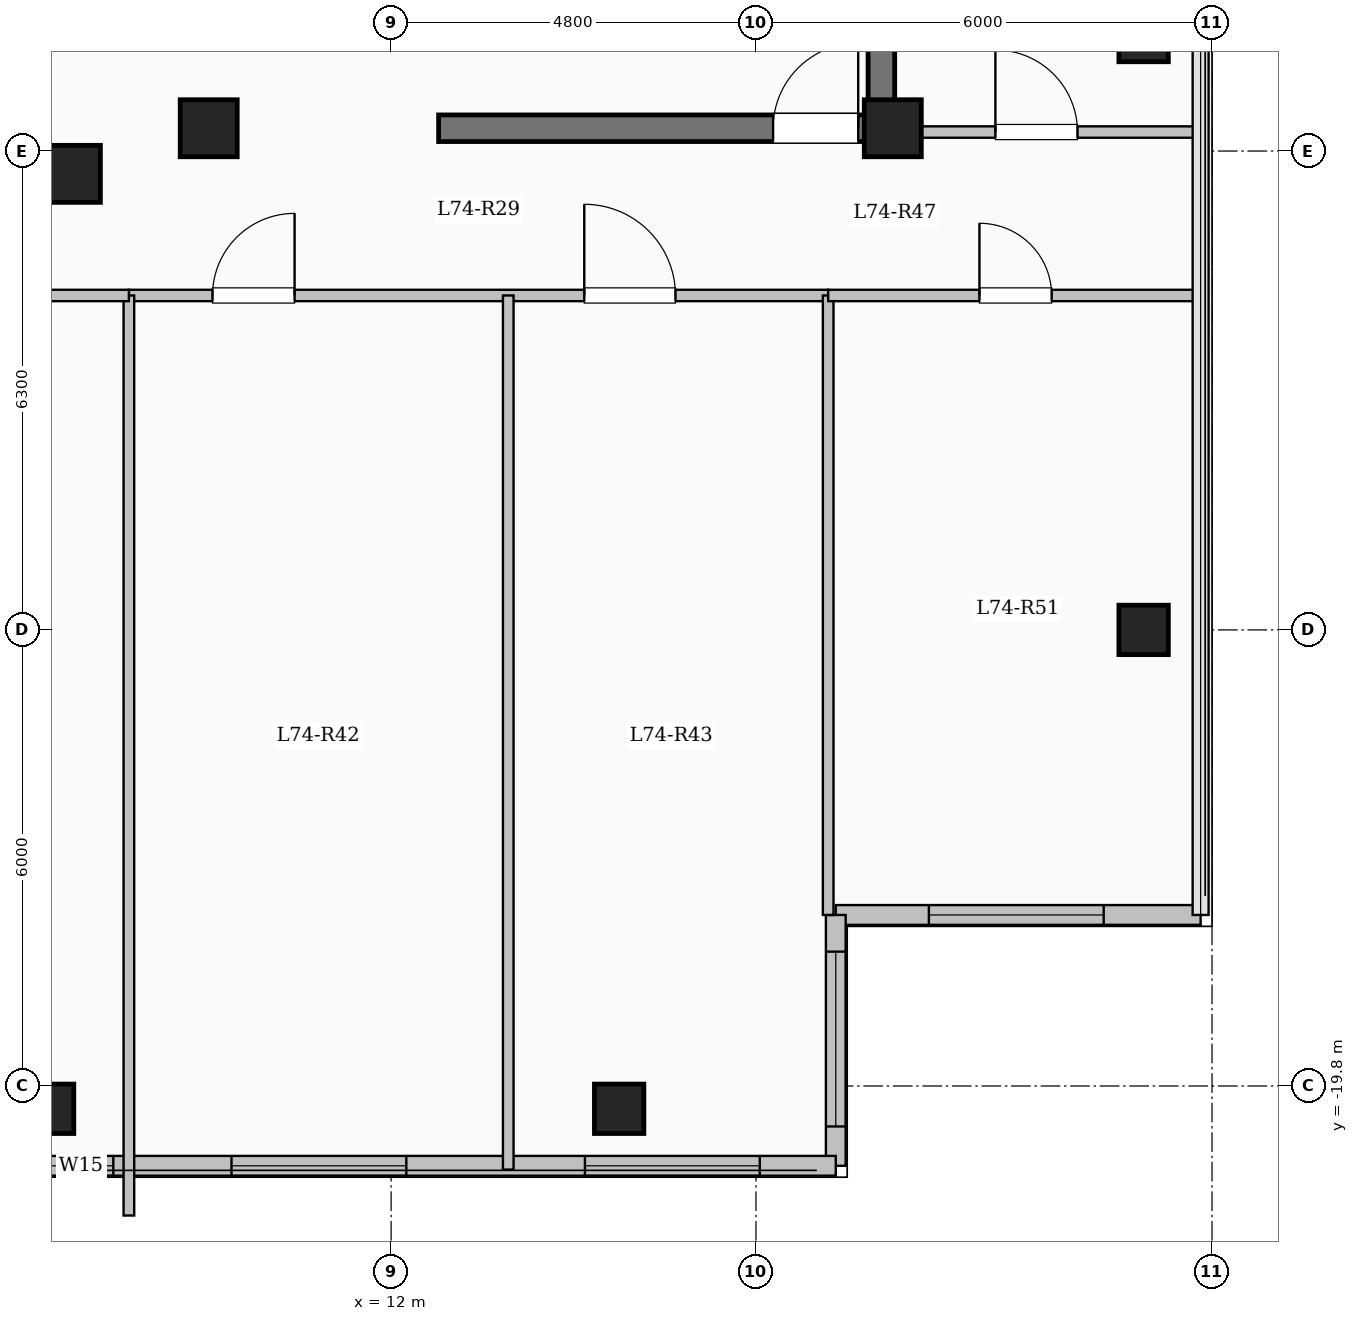
"""IFC4 building model, lengths in metres.
Left out: names, types, materials, properties, quantities, classifications, styles, units other than length and angle.
Written with IfcOpenShell. Run it as: python <this file> out.ifc"""

import sys

from ifc_helpers import new_model, si_unit, direction, frame, frame_2d, origin, origin_2d, place, context, subcontext, project, spatial, rectangle, extrude, element, fill, save


model = new_model("IFC4")
c1 = context("Model", 3, precision=1e-05, world=origin(), true_north=direction((0.0, 1.0)))
c2 = subcontext(c1, "Body", "Model", "MODEL_VIEW")
j1 = project(units=[si_unit("LENGTHUNIT", "METRE"), si_unit("PLANEANGLEUNIT", "RADIAN")], contexts=[c1])
p1 = place(None, origin())
s1 = spatial("IfcSite", under=j1, at=p1, CompositionType="ELEMENT")
p2 = place(p1, origin())
s2 = spatial("IfcBuilding", under=s1, at=p2, CompositionType="ELEMENT")
p3 = place(p2, frame((0.0, 0.0, 271.65)))
s3 = spatial("IfcBuildingStorey", under=s2, at=p3, CompositionType="ELEMENT", Elevation=271.65)
for number, where, z_axis, x_axis in (
    (1, (7.8, -7.8, 0.0), (0.0, 0.0, 1.0), (1.0, 0.0, 0.0)),
    (2, (9.6, -7.2, 0.0), (0.0, 0.0, 1.0), (1.0, 0.0, 0.0)),
    (3, (18.6, -7.2, 0.0), (0.0, 0.0, 1.0), (1.0, 0.0, 0.0)),
):
    element("IfcColumn", number, at=place(p3, frame(where, z_axis=z_axis, x_axis=x_axis)), inside=s3, PredefinedType="COLUMN", context=c2, shape_type="SweptSolid", body=[
        extrude(rectangle(XDim=0.75, YDim=0.75, at=origin_2d()), origin(), (0.0, 0.0, 1.0), 4.65),
    ])
for number, where, z_axis, x_axis in (
    (4, (7.5, -20.1, 0.0), (0.0, 0.0, 1.0), (1.0, 0.0, 0.0)),
    (5, (15.0, -20.1, 0.0), (0.0, 0.0, 1.0), (1.0, 0.0, 0.0)),
    (6, (21.9, -13.8, 0.0), (0.0, 0.0, 1.0), (1.0, 0.0, 0.0)),
    (7, (21.9, -6.0, 0.0), (0.0, 0.0, 1.0), (1.0, 0.0, 0.0)),
):
    element("IfcColumn", number, at=place(p3, frame(where, z_axis=z_axis, x_axis=x_axis)), inside=s3, PredefinedType="COLUMN", context=c2, shape_type="SweptSolid", body=[
        extrude(rectangle(XDim=0.65, YDim=0.65, at=origin_2d()), origin(), (0.0, 0.0, 1.0), 4.65),
    ])
p4 = place(p3, frame((22.65, -17.55, 0.0), z_axis=(0.0, 0.0, 1.0), x_axis=(-1.0, 0.0, 0.0)))
e8 = element("IfcWall", 8, at=p4, inside=s3, PredefinedType="SOLIDWALL", context=c2, shape_type="SweptSolid", body=[
    extrude(rectangle(XDim=4.8, YDim=0.26, at=frame_2d((2.4, 0.0))), origin(), (0.0, 0.0, 1.0), 4.35),
])
p5 = place(p4, frame((1.275, 0.0, 0.85)))
e9 = element("IfcOpeningElement", 9, at=p5, cuts=e8, PredefinedType="OPENING", context=c2, shape_type="SweptSolid", body=[
    extrude(rectangle(XDim=2.3, YDim=2.2, at=frame_2d((1.15, 1.1))), frame((0.0, 0.14, 0.0), z_axis=(0.0, -1.0, 0.0), x_axis=(1.0, 0.0, 0.0)), (0.0, 0.0, 1.0), 0.28),
])
p6 = place(p3, frame((17.85, -17.55, 0.0), z_axis=(0.0, 0.0, 1.0), x_axis=(0.0, -1.0, 0.0)))
e10 = element("IfcWall", 10, at=p6, inside=s3, PredefinedType="SOLIDWALL", context=c2, shape_type="SweptSolid", body=[
    extrude(rectangle(XDim=3.3, YDim=0.26, at=frame_2d((1.65, 0.0))), origin(), (0.0, 0.0, 1.0), 4.35),
])
p7 = place(p6, frame((0.482, 0.0, 0.85)))
e11 = element("IfcOpeningElement", 11, at=p7, cuts=e10, PredefinedType="OPENING", context=c2, shape_type="SweptSolid", body=[
    extrude(rectangle(XDim=2.3, YDim=2.2, at=frame_2d((1.15, 1.1))), frame((0.0, 0.14, 0.0), z_axis=(0.0, -1.0, 0.0), x_axis=(1.0, 0.0, 0.0)), (0.0, 0.0, 1.0), 0.28),
])
p8 = place(p3, frame((17.85, -20.85, 0.0), z_axis=(0.0, 0.0, 1.0), x_axis=(-1.0, 0.0, 0.0)))
e12 = element("IfcWall", 12, at=p8, inside=s3, PredefinedType="SOLIDWALL", context=c2, shape_type="SweptSolid", body=[
    extrude(rectangle(XDim=10.5, YDim=0.26, at=frame_2d((5.25, 0.0))), origin(), (0.0, 0.0, 1.0), 4.35),
])
p9 = place(p8, frame((1.0, 0.0, 0.85)))
e13 = element("IfcOpeningElement", 13, at=p9, cuts=e12, PredefinedType="OPENING", context=c2, shape_type="SweptSolid", body=[
    extrude(rectangle(XDim=2.3, YDim=2.2, at=frame_2d((1.15, 1.1))), frame((0.0, 0.14, 0.0), z_axis=(0.0, -1.0, 0.0), x_axis=(1.0, 0.0, 0.0)), (0.0, 0.0, 1.0), 0.28),
])
p10 = place(p8, frame((5.65, 0.0, 0.85)))
e14 = element("IfcOpeningElement", 14, at=p10, cuts=e12, PredefinedType="OPENING", context=c2, shape_type="SweptSolid", body=[
    extrude(rectangle(XDim=2.3, YDim=2.2, at=frame_2d((1.15, 1.1))), frame((0.0, 0.14, 0.0), z_axis=(0.0, -1.0, 0.0), x_axis=(1.0, 0.0, 0.0)), (0.0, 0.0, 1.0), 0.28),
])
p11 = place(p8, frame((9.505, 0.0, 0.95)))
e15 = element("IfcOpeningElement", 15, at=p11, cuts=e12, PredefinedType="OPENING", context=c2, shape_type="SweptSolid", body=[
    extrude(rectangle(XDim=0.85, YDim=1.5, at=frame_2d((0.425, 0.75))), frame((0.0, 0.14, 0.0), z_axis=(0.0, -1.0, 0.0), x_axis=(1.0, 0.0, 0.0)), (0.0, 0.0, 1.0), 0.28),
])
p12 = place(p3, frame((18.45, -7.375, 0.0), z_axis=(0.0, 0.0, 1.0), x_axis=(0.0, 1.0, 0.0)))
e16 = element("IfcWall", 16, at=p12, inside=s3, PredefinedType="SHEAR", context=c2, shape_type="SweptSolid", body=[
    extrude(rectangle(XDim=14.05, YDim=0.35, at=frame_2d((7.025, 0.0))), origin(), (0.0, 0.0, 1.0), 4.65),
])
p13 = place(p3, frame((12.625, -7.2, 0.0), z_axis=(0.0, 0.0, 1.0), x_axis=(1.0, 0.0, 0.0)))
e17 = element("IfcWall", 17, at=p13, inside=s3, PredefinedType="SHEAR", context=c2, shape_type="SweptSolid", body=[
    extrude(rectangle(XDim=6.0, YDim=0.35, at=frame_2d((3.0, 0.0))), origin(), (0.0, 0.0, 1.0), 4.65),
])
p14 = place(p13, frame((4.4, 0.0, 0.0)))
e18 = element("IfcOpeningElement", 18, at=p14, cuts=e17, PredefinedType="OPENING", context=c2, shape_type="SweptSolid", body=[
    extrude(rectangle(XDim=1.12, YDim=2.15, at=frame_2d((0.56, 1.075))), frame((0.0, 0.185, 0.0), z_axis=(0.0, -1.0, 0.0), x_axis=(1.0, 0.0, 0.0)), (0.0, 0.0, 1.0), 0.37),
])
p15 = place(p3, frame((8.55, -9.4, 0.0), z_axis=(0.0, 0.0, 1.0), x_axis=(1.0, 0.0, 0.0)))
e19 = element("IfcWall", 19, at=p15, inside=s3, PredefinedType="PARTITIONING", context=c2, shape_type="SweptSolid", body=[
    extrude(rectangle(XDim=9.2, YDim=0.15, at=frame_2d((4.6, 0.0))), origin(), (0.0, 0.0, 1.0), 4.35),
])
p16 = place(p15, frame((1.1, 0.0, 0.0)))
e20 = element("IfcOpeningElement", 20, at=p16, cuts=e19, PredefinedType="OPENING", context=c2, shape_type="SweptSolid", body=[
    extrude(rectangle(XDim=1.08, YDim=2.15, at=frame_2d((0.54, 1.075))), frame((0.0, 0.085, 0.0), z_axis=(0.0, -1.0, 0.0), x_axis=(1.0, 0.0, 0.0)), (0.0, 0.0, 1.0), 0.17),
])
p17 = place(p15, frame((5.991, 0.0, 0.0)))
e21 = element("IfcOpeningElement", 21, at=p17, cuts=e19, PredefinedType="OPENING", context=c2, shape_type="SweptSolid", body=[
    extrude(rectangle(XDim=1.2, YDim=2.15, at=frame_2d((0.6, 1.075))), frame((0.0, 0.085, 0.0), z_axis=(0.0, -1.0, 0.0), x_axis=(1.0, 0.0, 0.0)), (0.0, 0.0, 1.0), 0.17),
])
p18 = place(p3, frame((8.55, -21.504, 0.0), z_axis=(0.0, 0.0, 1.0), x_axis=(0.0, 1.0, 0.0)))
e22 = element("IfcWall", 22, at=p18, inside=s3, PredefinedType="PARTITIONING", context=c2, shape_type="SweptSolid", body=[
    extrude(rectangle(XDim=12.104, YDim=0.14, at=frame_2d((6.052, 0.0))), origin(), (0.0, 0.0, 1.0), 4.35),
])
p19 = place(p3, frame((13.541, -20.9, 0.0), z_axis=(0.0, 0.0, 1.0), x_axis=(0.0, 1.0, 0.0)))
e23 = element("IfcWall", 23, at=p19, inside=s3, PredefinedType="PARTITIONING", context=c2, shape_type="SweptSolid", body=[
    extrude(rectangle(XDim=11.5, YDim=0.14, at=frame_2d((5.75, 0.0))), origin(), (0.0, 0.0, 1.0), 4.35),
])
p20 = place(p3, frame((-8.55, -9.4, 0.0), z_axis=(0.0, 0.0, 1.0), x_axis=(1.0, 0.0, 0.0)))
e24 = element("IfcWall", 24, at=p20, inside=s3, PredefinedType="PARTITIONING", context=c2, shape_type="SweptSolid", body=[
    extrude(rectangle(XDim=17.1, YDim=0.15, at=frame_2d((8.55, 0.0))), origin(), (0.0, 0.0, 1.0), 4.35),
])
p21 = place(p20, frame((1.55, 0.0, 0.0)))
e25 = element("IfcOpeningElement", 25, at=p21, cuts=e24, PredefinedType="OPENING", context=c2, shape_type="SweptSolid", body=[
    extrude(rectangle(XDim=1.2, YDim=2.15, at=frame_2d((0.6, 1.075))), frame((0.0, 0.085, 0.0), z_axis=(0.0, -1.0, 0.0), x_axis=(1.0, 0.0, 0.0)), (0.0, 0.0, 1.0), 0.17),
])
p22 = place(p3, frame((18.45, -7.25, 0.0), z_axis=(0.0, 0.0, 1.0), x_axis=(1.0, 0.0, 0.0)))
e26 = element("IfcWall", 26, at=p22, inside=s3, PredefinedType="PARTITIONING", context=c2, shape_type="SweptSolid", body=[
    extrude(rectangle(XDim=4.23, YDim=0.15, at=frame_2d((2.115, 0.0))), origin(), (0.0, 0.0, 1.0), 4.35),
])
p23 = place(p22, frame((1.5, 0.0, 0.0)))
e27 = element("IfcOpeningElement", 27, at=p23, cuts=e26, PredefinedType="OPENING", context=c2, shape_type="SweptSolid", body=[
    extrude(rectangle(XDim=1.08, YDim=2.15, at=frame_2d((0.54, 1.075))), frame((0.0, 0.085, 0.0), z_axis=(0.0, -1.0, 0.0), x_axis=(1.0, 0.0, 0.0)), (0.0, 0.0, 1.0), 0.17),
])
p24 = place(p3, frame((17.75, -17.55, 0.0), z_axis=(0.0, 0.0, 1.0), x_axis=(0.0, 1.0, 0.0)))
e28 = element("IfcWall", 28, at=p24, inside=s3, PredefinedType="PARTITIONING", context=c2, shape_type="SweptSolid", body=[
    extrude(rectangle(XDim=8.15, YDim=0.14, at=frame_2d((4.075, 0.0))), origin(), (0.0, 0.0, 1.0), 4.35),
])
p25 = place(p3, frame((17.75, -9.4, 0.0), z_axis=(0.0, 0.0, 1.0), x_axis=(1.0, 0.0, 0.0)))
e29 = element("IfcWall", 29, at=p25, inside=s3, PredefinedType="PARTITIONING", context=c2, shape_type="SweptSolid", body=[
    extrude(rectangle(XDim=4.93, YDim=0.15, at=frame_2d((2.465, 0.0))), origin(), (0.0, 0.0, 1.0), 4.35),
])
p26 = place(p25, frame((1.99, 0.0, 0.0)))
e30 = element("IfcOpeningElement", 30, at=p26, cuts=e29, PredefinedType="OPENING", context=c2, shape_type="SweptSolid", body=[
    extrude(rectangle(XDim=0.95, YDim=2.15, at=frame_2d((0.475, 1.075))), frame((0.0, 0.085, 0.0), z_axis=(0.0, -1.0, 0.0), x_axis=(1.0, 0.0, 0.0)), (0.0, 0.0, 1.0), 0.17),
])
p27 = place(p5, origin())
e31 = element("IfcWindow", 31, at=p27, inside=s3, PartitioningType="SINGLE_PANEL", PredefinedType="WINDOW", context=c2, shape_type="SweptSolid", body=[
    extrude(rectangle(XDim=2.3, YDim=2.2, at=frame_2d((1.15, 1.1))), frame((0.0, 0.03, 0.0), z_axis=(0.0, -1.0, 0.0), x_axis=(1.0, 0.0, 0.0)), (0.0, 0.0, 1.0), 0.06),
])
fill(e9, e31)
p28 = place(p7, origin())
e32 = element("IfcWindow", 32, at=p28, inside=s3, PartitioningType="SINGLE_PANEL", PredefinedType="WINDOW", context=c2, shape_type="SweptSolid", body=[
    extrude(rectangle(XDim=2.3, YDim=2.2, at=frame_2d((1.15, 1.1))), frame((0.0, 0.03, 0.0), z_axis=(0.0, -1.0, 0.0), x_axis=(1.0, 0.0, 0.0)), (0.0, 0.0, 1.0), 0.06),
])
fill(e11, e32)
p29 = place(p9, origin())
e33 = element("IfcWindow", 33, at=p29, inside=s3, PartitioningType="SINGLE_PANEL", PredefinedType="WINDOW", context=c2, shape_type="SweptSolid", body=[
    extrude(rectangle(XDim=2.3, YDim=2.2, at=frame_2d((1.15, 1.1))), frame((0.0, 0.03, 0.0), z_axis=(0.0, -1.0, 0.0), x_axis=(1.0, 0.0, 0.0)), (0.0, 0.0, 1.0), 0.06),
])
fill(e13, e33)
p30 = place(p10, origin())
e34 = element("IfcWindow", 34, at=p30, inside=s3, PartitioningType="SINGLE_PANEL", PredefinedType="WINDOW", context=c2, shape_type="SweptSolid", body=[
    extrude(rectangle(XDim=2.3, YDim=2.2, at=frame_2d((1.15, 1.1))), frame((0.0, 0.03, 0.0), z_axis=(0.0, -1.0, 0.0), x_axis=(1.0, 0.0, 0.0)), (0.0, 0.0, 1.0), 0.06),
])
fill(e14, e34)
p31 = place(p11, origin())
e35 = element("IfcWindow", 35, at=p31, inside=s3, PartitioningType="SINGLE_PANEL", PredefinedType="WINDOW", context=c2, shape_type="SweptSolid", body=[
    extrude(rectangle(XDim=0.85, YDim=1.5, at=frame_2d((0.425, 0.75))), frame((0.0, 0.03, 0.0), z_axis=(0.0, -1.0, 0.0), x_axis=(1.0, 0.0, 0.0)), (0.0, 0.0, 1.0), 0.06),
])
fill(e15, e35)
p32 = place(p14, origin())
e36 = element("IfcDoor", 36, at=p32, inside=s3, OperationType="SINGLE_SWING_RIGHT", PredefinedType="DOOR", context=c2, shape_type="SweptSolid", body=[
    extrude(rectangle(XDim=1.12, YDim=2.15, at=frame_2d((0.56, 1.075))), frame((0.0, 0.025, 0.0), z_axis=(0.0, -1.0, 0.0), x_axis=(1.0, 0.0, 0.0)), (0.0, 0.0, 1.0), 0.05),
])
fill(e18, e36)
p33 = place(p16, origin())
e37 = element("IfcDoor", 37, at=p33, inside=s3, OperationType="SINGLE_SWING_RIGHT", PredefinedType="DOOR", context=c2, shape_type="SweptSolid", body=[
    extrude(rectangle(XDim=1.08, YDim=2.15, at=frame_2d((0.54, 1.075))), frame((0.0, 0.025, 0.0), z_axis=(0.0, -1.0, 0.0), x_axis=(1.0, 0.0, 0.0)), (0.0, 0.0, 1.0), 0.05),
])
fill(e20, e37)
p34 = place(p17, origin())
e38 = element("IfcDoor", 38, at=p34, inside=s3, OperationType="SINGLE_SWING_LEFT", PredefinedType="DOOR", context=c2, shape_type="SweptSolid", body=[
    extrude(rectangle(XDim=1.2, YDim=2.15, at=frame_2d((0.6, 1.075))), frame((0.0, 0.025, 0.0), z_axis=(0.0, -1.0, 0.0), x_axis=(1.0, 0.0, 0.0)), (0.0, 0.0, 1.0), 0.05),
])
fill(e21, e38)
p35 = place(p26, origin())
e39 = element("IfcDoor", 39, at=p35, inside=s3, OperationType="SINGLE_SWING_LEFT", PredefinedType="DOOR", context=c2, shape_type="SweptSolid", body=[
    extrude(rectangle(XDim=0.95, YDim=2.15, at=frame_2d((0.475, 1.075))), frame((0.0, 0.025, 0.0), z_axis=(0.0, -1.0, 0.0), x_axis=(1.0, 0.0, 0.0)), (0.0, 0.0, 1.0), 0.05),
])
fill(e30, e39)
p36 = place(p23, origin())
e40 = element("IfcDoor", 40, at=p36, inside=s3, OperationType="SINGLE_SWING_LEFT", PredefinedType="DOOR", context=c2, shape_type="SweptSolid", body=[
    extrude(rectangle(XDim=1.08, YDim=2.15, at=frame_2d((0.54, 1.075))), frame((0.0, 0.025, 0.0), z_axis=(0.0, -1.0, 0.0), x_axis=(1.0, 0.0, 0.0)), (0.0, 0.0, 1.0), 0.05),
])
fill(e27, e40)
save(model, sys.argv[1])
